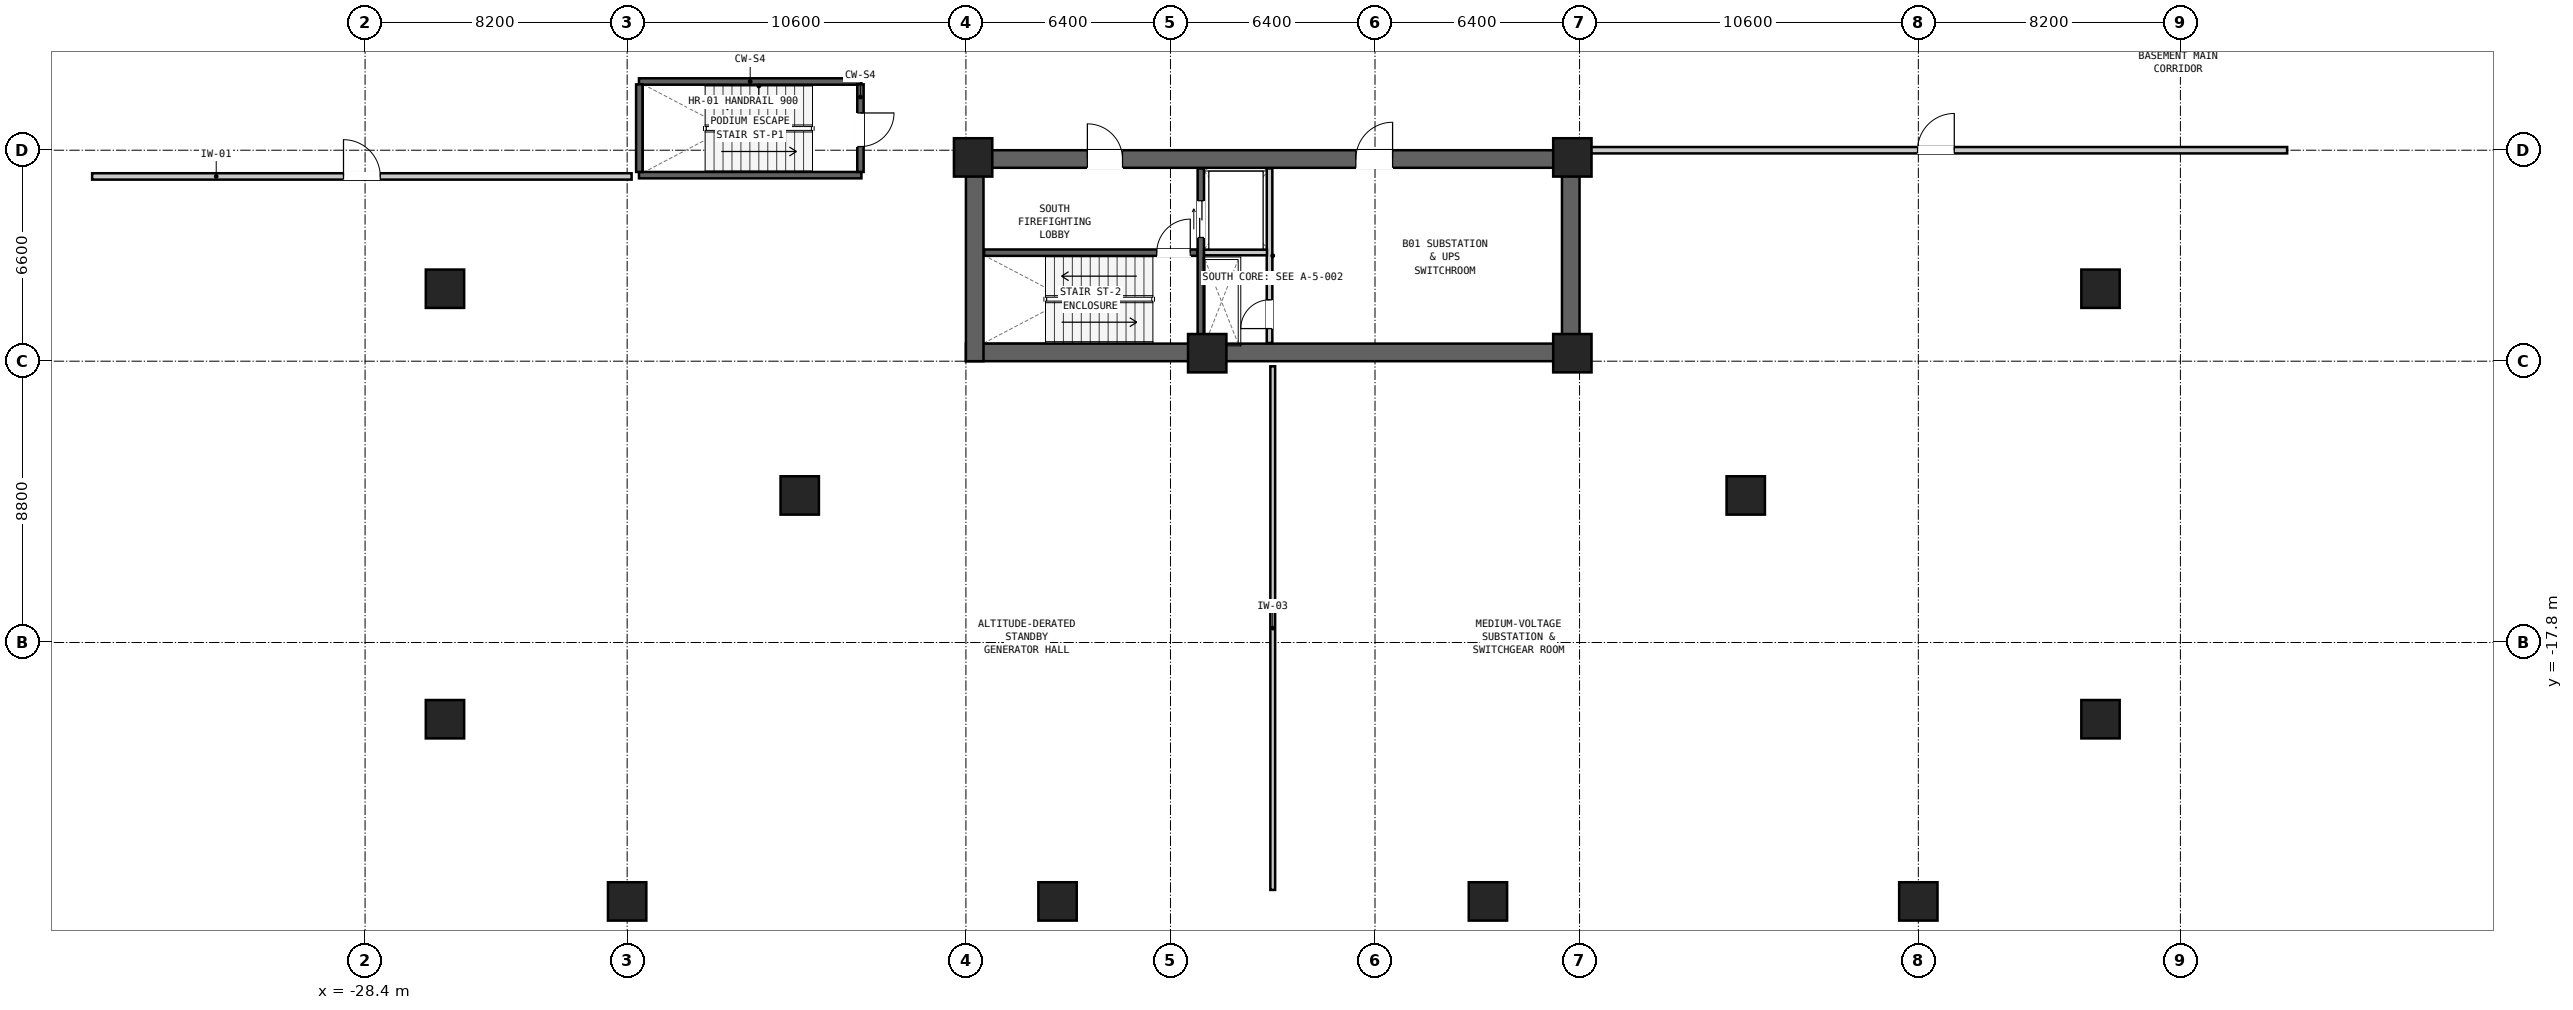
"""IFC4 building model, lengths in metres.
Left out: names, types, materials, properties, quantities, classifications, styles, units other than length and angle.
Written with IfcOpenShell. Run it as: python <this file> out.ifc"""

import sys

from ifc_helpers import new_model, si_unit, direction, frame, frame_2d, origin, origin_2d, place, context, subcontext, project, spatial, rectangle, extrude, element, fill, save


model = new_model("IFC4")
c1 = context("Model", 3, precision=1e-05, world=origin(), true_north=direction((0.0, 1.0)))
c2 = subcontext(c1, "Body", "Model", "MODEL_VIEW")
j1 = project(units=[si_unit("LENGTHUNIT", "METRE"), si_unit("PLANEANGLEUNIT", "RADIAN")], contexts=[c1])
p1 = place(None, origin())
s1 = spatial("IfcSite", under=j1, at=p1, CompositionType="ELEMENT")
p2 = place(p1, origin())
s2 = spatial("IfcBuilding", under=s1, at=p2, CompositionType="ELEMENT")
p3 = place(p2, frame((0.0, 0.0, -4.5)))
s3 = spatial("IfcBuildingStorey", under=s2, at=p3, CompositionType="ELEMENT", Elevation=-4.5)
p4 = place(p3, frame((-9.6, -8.725, 0.0), z_axis=(0.0, 0.0, 1.0), x_axis=(1.0, 0.0, 0.0)))
e1 = element("IfcWall", 1, at=p4, inside=s3, PredefinedType="SHEAR", context=c2, shape_type="SweptSolid", body=[
    extrude(rectangle(XDim=19.2, YDim=0.55, at=frame_2d((9.6, 0.0))), origin(), (0.0, 0.0, 1.0), 4.5),
])
p5 = place(p3, frame((-9.6, -2.675, 0.0), z_axis=(0.0, 0.0, 1.0), x_axis=(1.0, 0.0, 0.0)))
e2 = element("IfcWall", 2, at=p5, inside=s3, PredefinedType="SHEAR", context=c2, shape_type="SweptSolid", body=[
    extrude(rectangle(XDim=19.2, YDim=0.55, at=frame_2d((9.6, 0.0))), origin(), (0.0, 0.0, 1.0), 4.5),
])
p6 = place(p5, frame((3.8, 0.0, 0.0)))
e3 = element("IfcOpeningElement", 3, at=p6, cuts=e2, PredefinedType="OPENING", context=c2, shape_type="SweptSolid", body=[
    extrude(rectangle(XDim=1.1, YDim=2.08, at=frame_2d((0.55, 1.04))), frame((0.0, 0.287, 0.0), z_axis=(0.0, -1.0, 0.0), x_axis=(1.0, 0.0, 0.0)), (0.0, 0.0, 1.0), 0.574),
])
p7 = place(p5, frame((12.2, 0.0, 0.0)))
e4 = element("IfcOpeningElement", 4, at=p7, cuts=e2, PredefinedType="OPENING", context=c2, shape_type="SweptSolid", body=[
    extrude(rectangle(XDim=1.15, YDim=2.1, at=frame_2d((0.575, 1.05))), frame((0.0, 0.287, 0.0), z_axis=(0.0, -1.0, 0.0), x_axis=(1.0, 0.0, 0.0)), (0.0, 0.0, 1.0), 0.574),
])
for number, where, z_axis, x_axis in (
    (5, (-9.325, -9.0, 0.0), (0.0, 0.0, 1.0), (0.0, 1.0, 0.0)),
    (6, (9.325, -9.0, 0.0), (0.0, 0.0, 1.0), (0.0, 1.0, 0.0)),
):
    element("IfcWall", number, at=place(p3, frame(where, z_axis=z_axis, x_axis=x_axis)), inside=s3, PredefinedType="SHEAR", context=c2, shape_type="SweptSolid", body=[
        extrude(rectangle(XDim=6.6, YDim=0.55, at=frame_2d((3.3, 0.0))), origin(), (0.0, 0.0, 1.0), 4.5),
    ])
for number, where, z_axis, x_axis in (
    (7, (-14.8, -13.2, 0.0), (0.0, 0.0, 1.0), (1.0, 0.0, 0.0)),
    (8, (14.8, -13.2, 0.0), (0.0, 0.0, 1.0), (1.0, 0.0, 0.0)),
    (9, (-20.2, -25.9, 0.0), (0.0, 0.0, 1.0), (1.0, 0.0, 0.0)),
    (10, (-6.733, -25.9, 0.0), (0.0, 0.0, 1.0), (1.0, 0.0, 0.0)),
    (11, (6.733, -25.9, 0.0), (0.0, 0.0, 1.0), (1.0, 0.0, 0.0)),
    (12, (20.2, -25.9, 0.0), (0.0, 0.0, 1.0), (1.0, 0.0, 0.0)),
    (13, (25.9, -20.2, 0.0), (0.0, 0.0, 1.0), (0.0, 1.0, 0.0)),
    (14, (25.9, -6.733, 0.0), (0.0, 0.0, 1.0), (0.0, 1.0, 0.0)),
    (15, (-25.9, -6.733, 0.0), (0.0, 0.0, 1.0), (0.0, 1.0, 0.0)),
    (16, (-25.9, -20.2, 0.0), (0.0, 0.0, 1.0), (0.0, 1.0, 0.0)),
    (17, (-9.375, -2.625, 0.0), (0.0, 0.0, 1.0), (1.0, 0.0, 0.0)),
    (18, (9.375, -2.625, 0.0), (0.0, 0.0, 1.0), (1.0, 0.0, 0.0)),
    (19, (-2.05, -8.75, 0.0), (0.0, 0.0, 1.0), (1.0, 0.0, 0.0)),
    (20, (9.375, -8.75, 0.0), (0.0, 0.0, 1.0), (1.0, 0.0, 0.0)),
):
    element("IfcColumn", number, at=place(p3, frame(where, z_axis=z_axis, x_axis=x_axis)), inside=s3, PredefinedType="COLUMN", context=c2, shape_type="SweptSolid", body=[
        extrude(rectangle(XDim=1.2, YDim=1.2, at=origin_2d()), origin(), (0.0, 0.0, 1.0), 4.5),
    ])
p8 = place(p3, frame((-9.03, -5.605, 0.0), z_axis=(0.0, 0.0, 1.0), x_axis=(1.0, 0.0, 0.0)))
e21 = element("IfcWall", 21, at=p8, inside=s3, PredefinedType="SHEAR", context=c2, shape_type="SweptSolid", body=[
    extrude(rectangle(XDim=6.67, YDim=0.2, at=frame_2d((3.335, 0.0))), origin(), (0.0, 0.0, 1.0), 4.18),
])
p9 = place(p8, frame((5.4, 0.0, 0.0)))
e22 = element("IfcOpeningElement", 22, at=p9, cuts=e21, PredefinedType="OPENING", context=c2, shape_type="SweptSolid", body=[
    extrude(rectangle(XDim=1.05, YDim=2.08, at=frame_2d((0.525, 1.04))), frame((0.0, 0.112, 0.0), z_axis=(0.0, -1.0, 0.0), x_axis=(1.0, 0.0, 0.0)), (0.0, 0.0, 1.0), 0.224),
])
p10 = place(p3, frame((-2.25, -8.43, 0.0), z_axis=(0.0, 0.0, 1.0), x_axis=(0.0, 1.0, 0.0)))
e23 = element("IfcWall", 23, at=p10, inside=s3, PredefinedType="SHEAR", context=c2, shape_type="SweptSolid", body=[
    extrude(rectangle(XDim=5.46, YDim=0.2, at=frame_2d((2.73, 0.0))), origin(), (0.0, 0.0, 1.0), 4.18),
])
p11 = place(p10, frame((3.3, 0.0, 0.0)))
e24 = element("IfcOpeningElement", 24, at=p11, cuts=e23, PredefinedType="OPENING", context=c2, shape_type="SweptSolid", body=[
    extrude(rectangle(XDim=1.15, YDim=2.08, at=frame_2d((0.575, 1.04))), frame((0.0, 0.112, 0.0), z_axis=(0.0, -1.0, 0.0), x_axis=(1.0, 0.0, 0.0)), (0.0, 0.0, 1.0), 0.224),
])
p12 = place(p3, frame((-0.1, -8.43, 0.0), z_axis=(0.0, 0.0, 1.0), x_axis=(0.0, 1.0, 0.0)))
e25 = element("IfcWall", 25, at=p12, inside=s3, PredefinedType="PARTITIONING", context=c2, shape_type="SweptSolid", body=[
    extrude(rectangle(XDim=5.46, YDim=0.175, at=frame_2d((2.73, 0.0))), origin(), (0.0, 0.0, 1.0), 4.18),
])
p13 = place(p12, frame((0.45, 0.0, 0.0)))
e26 = element("IfcOpeningElement", 26, at=p13, cuts=e25, PredefinedType="OPENING", context=c2, shape_type="SweptSolid", body=[
    extrude(rectangle(XDim=0.9, YDim=2.05, at=frame_2d((0.45, 1.025))), frame((0.0, 0.1, 0.0), z_axis=(0.0, -1.0, 0.0), x_axis=(1.0, 0.0, 0.0)), (0.0, 0.0, 1.0), 0.199),
])
p14 = place(p3, frame((-2.15, -5.6, 0.0), z_axis=(0.0, 0.0, 1.0), x_axis=(1.0, 0.0, 0.0)))
e27 = element("IfcWall", 27, at=p14, inside=s3, PredefinedType="PARTITIONING", context=c2, shape_type="SweptSolid", body=[
    extrude(rectangle(XDim=1.97, YDim=0.175, at=frame_2d((0.985, 0.0))), origin(), (0.0, 0.0, 1.0), 4.18),
])
for number, where, z_axis, x_axis in (
    (28, (-19.83, -0.25, 0.0), (0.0, 0.0, 1.0), (1.0, 0.0, 0.0)),
    (29, (-19.83, -3.18, 0.0), (0.0, 0.0, 1.0), (1.0, 0.0, 0.0)),
):
    element("IfcWall", number, at=place(p3, frame(where, z_axis=z_axis, x_axis=x_axis)), inside=s3, PredefinedType="SHEAR", context=c2, shape_type="SweptSolid", body=[
        extrude(rectangle(XDim=6.96, YDim=0.2, at=frame_2d((3.48, 0.0))), origin(), (0.0, 0.0, 1.0), 4.18),
    ])
p15 = place(p3, frame((-12.9, -0.34, 0.0), z_axis=(0.0, 0.0, 1.0), x_axis=(0.0, -1.0, 0.0)))
e30 = element("IfcWall", 30, at=p15, inside=s3, PredefinedType="SHEAR", context=c2, shape_type="SweptSolid", body=[
    extrude(rectangle(XDim=2.74, YDim=0.2, at=frame_2d((1.37, 0.0))), origin(), (0.0, 0.0, 1.0), 4.18),
])
p16 = place(p15, frame((0.895, 0.0, 0.0)))
e31 = element("IfcOpeningElement", 31, at=p16, cuts=e30, PredefinedType="OPENING", context=c2, shape_type="SweptSolid", body=[
    extrude(rectangle(XDim=1.05, YDim=2.08, at=frame_2d((0.525, 1.04))), frame((0.0, 0.112, 0.0), z_axis=(0.0, -1.0, 0.0), x_axis=(1.0, 0.0, 0.0)), (0.0, 0.0, 1.0), 0.224),
])
p17 = place(p3, frame((-19.82, -3.08, 0.0), z_axis=(0.0, 0.0, 1.0), x_axis=(0.0, 1.0, 0.0)))
e32 = element("IfcWall", 32, at=p17, inside=s3, PredefinedType="SHEAR", context=c2, shape_type="SweptSolid", body=[
    extrude(rectangle(XDim=2.74, YDim=0.2, at=frame_2d((1.37, 0.0))), origin(), (0.0, 0.0, 1.0), 4.18),
])
p18 = place(p3, frame((-36.94, -3.22, 0.0), z_axis=(0.0, 0.0, 1.0), x_axis=(1.0, 0.0, 0.0)))
e33 = element("IfcWall", 33, at=p18, inside=s3, PredefinedType="PARTITIONING", context=c2, shape_type="SweptSolid", body=[
    extrude(rectangle(XDim=16.88, YDim=0.2, at=frame_2d((8.44, 0.0))), origin(), (0.0, 0.0, 1.0), 3.042),
])
p19 = place(p18, frame((7.865, 0.0, 0.0)))
e34 = element("IfcOpeningElement", 34, at=p19, cuts=e33, PredefinedType="OPENING", context=c2, shape_type="SweptSolid", body=[
    extrude(rectangle(XDim=1.15, YDim=2.1, at=frame_2d((0.575, 1.05))), frame((0.0, 0.112, 0.0), z_axis=(0.0, -1.0, 0.0), x_axis=(1.0, 0.0, 0.0)), (0.0, 0.0, 1.0), 0.224),
])
p20 = place(p3, frame((9.76, -2.4, 0.0), z_axis=(0.0, 0.0, 1.0), x_axis=(1.0, 0.0, 0.0)))
e35 = element("IfcWall", 35, at=p20, inside=s3, PredefinedType="PARTITIONING", context=c2, shape_type="SweptSolid", body=[
    extrude(rectangle(XDim=21.98, YDim=0.2, at=frame_2d((10.99, 0.0))), origin(), (0.0, 0.0, 1.0), 3.042),
])
p21 = place(p20, frame((10.415, 0.0, 0.0)))
e36 = element("IfcOpeningElement", 36, at=p21, cuts=e35, PredefinedType="OPENING", context=c2, shape_type="SweptSolid", body=[
    extrude(rectangle(XDim=1.15, YDim=2.1, at=frame_2d((0.575, 1.05))), frame((0.0, 0.112, 0.0), z_axis=(0.0, -1.0, 0.0), x_axis=(1.0, 0.0, 0.0)), (0.0, 0.0, 1.0), 0.224),
])
p22 = place(p3, frame((0.0, -25.54, 0.0), z_axis=(0.0, 0.0, 1.0), x_axis=(0.0, 1.0, 0.0)))
e37 = element("IfcWall", 37, at=p22, inside=s3, PredefinedType="PARTITIONING", context=c2, shape_type="SweptSolid", body=[
    extrude(rectangle(XDim=16.38, YDim=0.15, at=frame_2d((8.19, 0.0))), origin(), (0.0, 0.0, 1.0), 3.553),
])
p23 = place(p9, origin())
e38 = element("IfcDoor", 38, at=p23, inside=s3, OperationType="SINGLE_SWING_RIGHT", PredefinedType="DOOR", context=c2, shape_type="SweptSolid", body=[
    extrude(rectangle(XDim=1.05, YDim=2.08, at=frame_2d((0.525, 1.04))), frame((0.0, 0.025, 0.0), z_axis=(0.0, -1.0, 0.0), x_axis=(1.0, 0.0, 0.0)), (0.0, 0.0, 1.0), 0.05),
])
fill(e22, e38)
p24 = place(p6, origin())
e39 = element("IfcDoor", 39, at=p24, inside=s3, OperationType="SINGLE_SWING_LEFT", PredefinedType="DOOR", context=c2, shape_type="SweptSolid", body=[
    extrude(rectangle(XDim=1.1, YDim=2.08, at=frame_2d((0.55, 1.04))), frame((0.0, 0.025, 0.0), z_axis=(0.0, -1.0, 0.0), x_axis=(1.0, 0.0, 0.0)), (0.0, 0.0, 1.0), 0.05),
])
fill(e3, e39)
p25 = place(p11, origin())
e40 = element("IfcDoor", 40, at=p25, inside=s3, OperationType="DOUBLE_DOOR_SLIDING", PredefinedType="DOOR", context=c2, shape_type="SweptSolid", body=[
    extrude(rectangle(XDim=1.15, YDim=2.08, at=frame_2d((0.575, 1.04))), frame((0.0, 0.025, 0.0), z_axis=(0.0, -1.0, 0.0), x_axis=(1.0, 0.0, 0.0)), (0.0, 0.0, 1.0), 0.05),
])
fill(e24, e40)
p26 = place(p13, origin())
e41 = element("IfcDoor", 41, at=p26, inside=s3, OperationType="SINGLE_SWING_LEFT", PredefinedType="DOOR", context=c2, shape_type="SweptSolid", body=[
    extrude(rectangle(XDim=0.9, YDim=2.05, at=frame_2d((0.45, 1.025))), frame((0.0, 0.025, 0.0), z_axis=(0.0, -1.0, 0.0), x_axis=(1.0, 0.0, 0.0)), (0.0, 0.0, 1.0), 0.05),
])
fill(e26, e41)
p27 = place(p7, origin())
e42 = element("IfcDoor", 42, at=p27, inside=s3, OperationType="SINGLE_SWING_RIGHT", PredefinedType="DOOR", context=c2, shape_type="SweptSolid", body=[
    extrude(rectangle(XDim=1.15, YDim=2.1, at=frame_2d((0.575, 1.05))), frame((0.0, 0.025, 0.0), z_axis=(0.0, -1.0, 0.0), x_axis=(1.0, 0.0, 0.0)), (0.0, 0.0, 1.0), 0.05),
])
fill(e4, e42)
p28 = place(p16, origin())
e43 = element("IfcDoor", 43, at=p28, inside=s3, OperationType="SINGLE_SWING_LEFT", PredefinedType="DOOR", context=c2, shape_type="SweptSolid", body=[
    extrude(rectangle(XDim=1.05, YDim=2.08, at=frame_2d((0.525, 1.04))), frame((0.0, 0.025, 0.0), z_axis=(0.0, -1.0, 0.0), x_axis=(1.0, 0.0, 0.0)), (0.0, 0.0, 1.0), 0.05),
])
fill(e31, e43)
p29 = place(p19, origin())
e44 = element("IfcDoor", 44, at=p29, inside=s3, OperationType="SINGLE_SWING_LEFT", PredefinedType="DOOR", context=c2, shape_type="SweptSolid", body=[
    extrude(rectangle(XDim=1.15, YDim=2.1, at=frame_2d((0.575, 1.05))), frame((0.0, 0.025, 0.0), z_axis=(0.0, -1.0, 0.0), x_axis=(1.0, 0.0, 0.0)), (0.0, 0.0, 1.0), 0.05),
])
fill(e34, e44)
p30 = place(p21, origin())
e45 = element("IfcDoor", 45, at=p30, inside=s3, OperationType="SINGLE_SWING_RIGHT", PredefinedType="DOOR", context=c2, shape_type="SweptSolid", body=[
    extrude(rectangle(XDim=1.15, YDim=2.1, at=frame_2d((0.575, 1.05))), frame((0.0, 0.025, 0.0), z_axis=(0.0, -1.0, 0.0), x_axis=(1.0, 0.0, 0.0)), (0.0, 0.0, 1.0), 0.05),
])
fill(e36, e45)
save(model, sys.argv[1])
